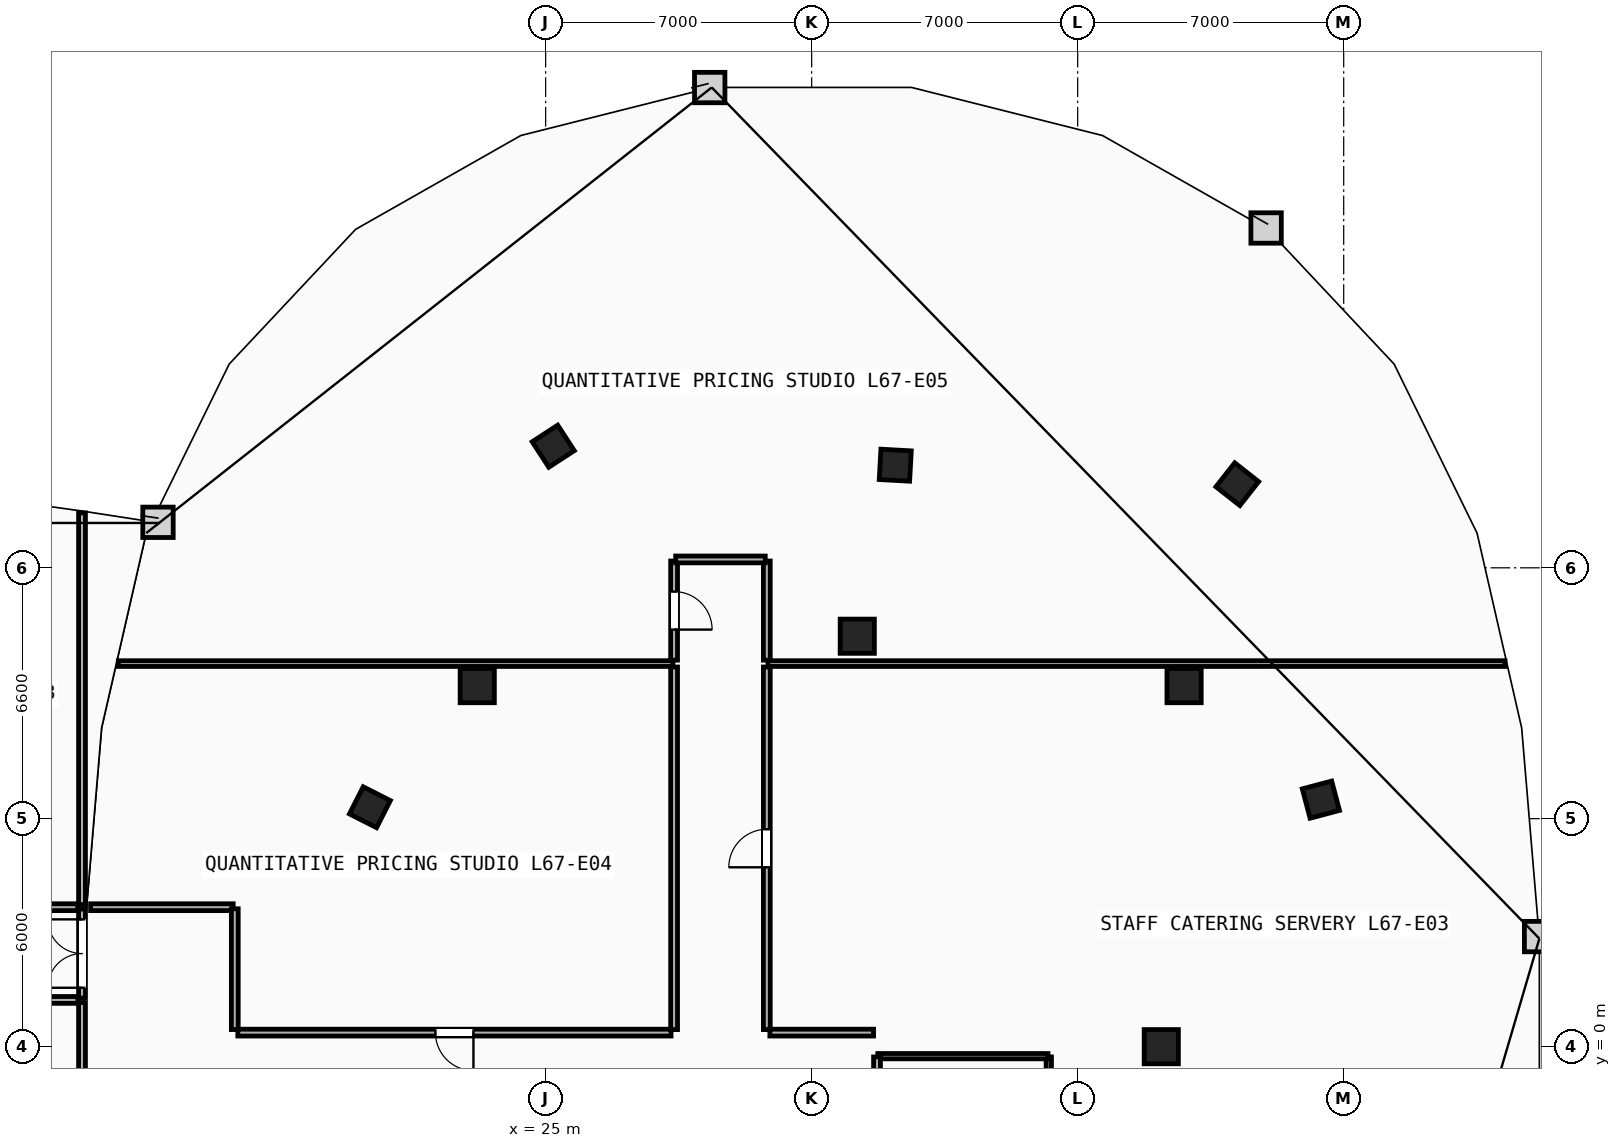
"""IFC4 building model, lengths in metres.
Left out: names, types, materials, properties, quantities, classifications, styles, units other than length and angle.
Written with IfcOpenShell. Run it as: python <this file> out.ifc"""

import sys

from ifc_helpers import new_model, si_unit, direction, frame, frame_2d, origin, origin_2d, place, context, subcontext, project, spatial, rectangle, extrude, element, fill, save


model = new_model("IFC4")
c1 = context("Model", 3, precision=1e-05, world=origin(), true_north=direction((0.0, 1.0)))
c2 = subcontext(c1, "Body", "Model", "MODEL_VIEW")
j1 = project(units=[si_unit("LENGTHUNIT", "METRE"), si_unit("PLANEANGLEUNIT", "RADIAN")], contexts=[c1])
p1 = place(None, origin())
s1 = spatial("IfcSite", under=j1, at=p1, CompositionType="ELEMENT")
p2 = place(p1, origin())
s2 = spatial("IfcBuilding", under=s1, at=p2, CompositionType="ELEMENT")
p3 = place(p2, frame((0.0, 0.0, 254.0)))
s3 = spatial("IfcBuildingStorey", under=s2, at=p3, CompositionType="ELEMENT", Elevation=254.0)
for number, where, z_axis, x_axis in (
    (1, (41.2, 0.0, 0.0), (0.0, 0.0, 1.0), (1.0, 0.0, 0.0)),
    (2, (41.8, 9.5, 0.0), (0.0, 0.0, 1.0), (1.0, 0.0, 0.0)),
    (3, (33.2, 10.8, 0.0), (0.0, 0.0, 1.0), (1.0, 0.0, 0.0)),
    (4, (23.2, 9.5, 0.0), (0.0, 0.0, 1.0), (1.0, 0.0, 0.0)),
):
    element("IfcColumn", number, at=place(p3, frame(where, z_axis=z_axis, x_axis=x_axis)), inside=s3, PredefinedType="COLUMN", context=c2, shape_type="SweptSolid", body=[
        extrude(rectangle(XDim=0.9, YDim=0.9, at=origin_2d()), origin(), (0.0, 0.0, 1.0), 3.6),
    ])
for number, where, z_axis, x_axis in (
    (5, (45.4, 6.5, 0.0), (0.0, 0.0, 1.0), (-0.256, 0.967, 0.0)),
    (6, (43.2, 14.8, 0.0), (0.0, 0.0, 1.0), (-0.786, 0.618, 0.0)),
    (7, (34.2, 15.3, 0.0), (0.0, 0.0, 1.0), (-0.998, 0.055, 0.0)),
    (8, (25.2, 15.8, 0.0), (0.0, 0.0, 1.0), (-0.838, -0.546, 0.0)),
    (9, (20.375, 6.3, 0.0), (0.0, 0.0, 1.0), (-0.453, -0.892, 0.0)),
):
    element("IfcColumn", number, at=place(p3, frame(where, z_axis=z_axis, x_axis=x_axis)), inside=s3, PredefinedType="COLUMN", context=c2, shape_type="SweptSolid", body=[
        extrude(rectangle(XDim=0.8, YDim=0.8, at=origin_2d()), origin(), (0.0, 0.0, 1.0), 3.6),
    ])
p4 = place(p3, frame((38.24, -4.545, 0.0), z_axis=(0.0, 0.0, 1.0), x_axis=(0.0, 1.0, 0.0)))
e10 = element("IfcWall", 10, at=p4, inside=s3, PredefinedType="PARTITIONING", context=c2, shape_type="SweptSolid", body=[
    extrude(rectangle(XDim=4.275, YDim=0.14, at=frame_2d((2.137, 0.0))), origin(), (0.0, 0.0, 1.0), 3.34),
])
p5 = place(p3, frame((33.74, -0.25, 0.0), z_axis=(0.0, 0.0, 1.0), x_axis=(1.0, 0.0, 0.0)))
e11 = element("IfcWall", 11, at=p5, inside=s3, PredefinedType="PARTITIONING", context=c2, shape_type="SweptSolid", body=[
    extrude(rectangle(XDim=4.48, YDim=0.14, at=frame_2d((2.24, 0.0))), origin(), (0.0, 0.0, 1.0), 3.34),
])
p6 = place(p3, frame((33.72, -4.53, 0.0), z_axis=(0.0, 0.0, 1.0), x_axis=(0.0, 1.0, 0.0)))
e12 = element("IfcWall", 12, at=p6, inside=s3, PredefinedType="PARTITIONING", context=c2, shape_type="SweptSolid", body=[
    extrude(rectangle(XDim=4.26, YDim=0.18, at=frame_2d((2.13, 0.0))), origin(), (0.0, 0.0, 1.0), 3.34),
])
p7 = place(p6, frame((1.655, 0.0, 0.0)))
e13 = element("IfcOpeningElement", 13, at=p7, cuts=e12, PredefinedType="OPENING", context=c2, shape_type="SweptSolid", body=[
    extrude(rectangle(XDim=0.95, YDim=2.1, at=frame_2d((0.475, 1.05))), frame((0.0, 0.1, 0.0), z_axis=(0.0, -1.0, 0.0), x_axis=(1.0, 0.0, 0.0)), (0.0, 0.0, 1.0), 0.2),
])
p8 = place(p3, frame((13.755, 10.08, 0.0), z_axis=(0.0, 0.0, 1.0), x_axis=(1.0, 0.0, 0.0)))
e14 = element("IfcWall", 14, at=p8, inside=s3, PredefinedType="PARTITIONING", context=c2, shape_type="SweptSolid", body=[
    extrude(rectangle(XDim=14.595, YDim=0.15, at=frame_2d((7.297, 0.0))), origin(), (0.0, 0.0, 1.0), 2.724),
])
p9 = place(p3, frame((30.85, 10.08, 0.0), z_axis=(0.0, 0.0, 1.0), x_axis=(1.0, 0.0, 0.0)))
e15 = element("IfcWall", 15, at=p9, inside=s3, PredefinedType="PARTITIONING", context=c2, shape_type="SweptSolid", body=[
    extrude(rectangle(XDim=19.395, YDim=0.15, at=frame_2d((9.697, 0.0))), origin(), (0.0, 0.0, 1.0), 2.724),
])
p10 = place(p3, frame((30.82, 0.45, 0.0), z_axis=(0.0, 0.0, 1.0), x_axis=(0.0, 1.0, 0.0)))
e16 = element("IfcWall", 16, at=p10, inside=s3, PredefinedType="PARTITIONING", context=c2, shape_type="SweptSolid", body=[
    extrude(rectangle(XDim=9.54, YDim=0.18, at=frame_2d((4.77, 0.0))), origin(), (0.0, 0.0, 1.0), 3.34),
])
p11 = place(p10, frame((4.27, 0.0, 0.0)))
e17 = element("IfcOpeningElement", 17, at=p11, cuts=e16, PredefinedType="OPENING", context=c2, shape_type="SweptSolid", body=[
    extrude(rectangle(XDim=1.0, YDim=2.15, at=frame_2d((0.5, 1.075))), frame((0.0, 0.1, 0.0), z_axis=(0.0, -1.0, 0.0), x_axis=(1.0, 0.0, 0.0)), (0.0, 0.0, 1.0), 0.2),
])
p12 = place(p3, frame((33.628, 0.37, 0.0), z_axis=(0.0, 0.0, 1.0), x_axis=(-1.0, 0.0, 0.0)))
e18 = element("IfcWall", 18, at=p12, inside=s3, PredefinedType="PARTITIONING", context=c2, shape_type="SweptSolid", body=[
    extrude(rectangle(XDim=2.729, YDim=0.18, at=frame_2d((1.364, 0.0))), origin(), (0.0, 0.0, 1.0), 3.34),
])
p13 = place(p3, frame((28.3, 0.37, 0.0), z_axis=(0.0, 0.0, 1.0), x_axis=(-1.0, 0.0, 0.0)))
e19 = element("IfcWall", 19, at=p13, inside=s3, PredefinedType="PARTITIONING", context=c2, shape_type="SweptSolid", body=[
    extrude(rectangle(XDim=11.4, YDim=0.18, at=frame_2d((5.7, 0.0))), origin(), (0.0, 0.0, 1.0), 3.34),
])
p14 = place(p13, frame((5.2, 0.0, 0.0)))
e20 = element("IfcOpeningElement", 20, at=p14, cuts=e19, PredefinedType="OPENING", context=c2, shape_type="SweptSolid", body=[
    extrude(rectangle(XDim=1.0, YDim=2.15, at=frame_2d((0.5, 1.075))), frame((0.0, 0.1, 0.0), z_axis=(0.0, -1.0, 0.0), x_axis=(1.0, 0.0, 0.0)), (0.0, 0.0, 1.0), 0.2),
])
p15 = place(p3, frame((28.38, 9.99, 0.0), z_axis=(0.0, 0.0, 1.0), x_axis=(0.0, -1.0, 0.0)))
e21 = element("IfcWall", 21, at=p15, inside=s3, PredefinedType="PARTITIONING", context=c2, shape_type="SweptSolid", body=[
    extrude(rectangle(XDim=9.54, YDim=0.18, at=frame_2d((4.77, 0.0))), origin(), (0.0, 0.0, 1.0), 3.34),
])
p16 = place(p3, frame((16.779, 3.67, 0.0), z_axis=(0.0, 0.0, 1.0), x_axis=(-1.0, 0.0, 0.0)))
e22 = element("IfcWall", 22, at=p16, inside=s3, PredefinedType="PARTITIONING", context=c2, shape_type="SweptSolid", body=[
    extrude(rectangle(XDim=3.753, YDim=0.18, at=frame_2d((1.876, 0.0))), origin(), (0.0, 0.0, 1.0), 3.34),
])
p17 = place(p3, frame((16.82, 0.45, 0.0), z_axis=(0.0, 0.0, 1.0), x_axis=(0.0, 1.0, 0.0)))
e23 = element("IfcWall", 23, at=p17, inside=s3, PredefinedType="PARTITIONING", context=c2, shape_type="SweptSolid", body=[
    extrude(rectangle(XDim=3.178, YDim=0.18, at=frame_2d((1.589, 0.0))), origin(), (0.0, 0.0, 1.0), 3.34),
])
p18 = place(p3, frame((28.38, 12.779, 0.0), z_axis=(0.0, 0.0, 1.0), x_axis=(0.0, -1.0, 0.0)))
e24 = element("IfcWall", 24, at=p18, inside=s3, PredefinedType="PARTITIONING", context=c2, shape_type="SweptSolid", body=[
    extrude(rectangle(XDim=2.609, YDim=0.18, at=frame_2d((1.304, 0.0))), origin(), (0.0, 0.0, 1.0), 3.34),
])
p19 = place(p18, frame((0.804, 0.0, 0.0)))
e25 = element("IfcOpeningElement", 25, at=p19, cuts=e24, PredefinedType="OPENING", context=c2, shape_type="SweptSolid", body=[
    extrude(rectangle(XDim=1.0, YDim=2.15, at=frame_2d((0.5, 1.075))), frame((0.0, 0.1, 0.0), z_axis=(0.0, -1.0, 0.0), x_axis=(1.0, 0.0, 0.0)), (0.0, 0.0, 1.0), 0.2),
])
p20 = place(p3, frame((30.82, 10.17, 0.0), z_axis=(0.0, 0.0, 1.0), x_axis=(0.0, 1.0, 0.0)))
e26 = element("IfcWall", 26, at=p20, inside=s3, PredefinedType="PARTITIONING", context=c2, shape_type="SweptSolid", body=[
    extrude(rectangle(XDim=2.609, YDim=0.18, at=frame_2d((1.304, 0.0))), origin(), (0.0, 0.0, 1.0), 3.34),
])
p21 = place(p3, frame((30.779, 12.82, 0.0), z_axis=(0.0, 0.0, 1.0), x_axis=(-1.0, 0.0, 0.0)))
e27 = element("IfcWall", 27, at=p21, inside=s3, PredefinedType="PARTITIONING", context=c2, shape_type="SweptSolid", body=[
    extrude(rectangle(XDim=2.357, YDim=0.18, at=frame_2d((1.179, 0.0))), origin(), (0.0, 0.0, 1.0), 3.34),
])
p22 = place(p3, frame((3.895, 1.23, 0.0), z_axis=(0.0, 0.0, 1.0), x_axis=(1.0, 0.0, 0.0)))
e28 = element("IfcWall", 28, at=p22, inside=s3, PredefinedType="PARTITIONING", context=c2, shape_type="SweptSolid", body=[
    extrude(rectangle(XDim=8.793, YDim=0.18, at=frame_2d((4.397, 0.0))), origin(), (0.0, 0.0, 1.0), 3.34),
])
p23 = place(p22, frame((3.597, 0.0, 0.0)))
e29 = element("IfcOpeningElement", 29, at=p23, cuts=e28, PredefinedType="OPENING", context=c2, shape_type="SweptSolid", body=[
    extrude(rectangle(XDim=1.6, YDim=2.2, at=frame_2d((0.8, 1.1))), frame((0.0, 0.1, 0.0), z_axis=(0.0, -1.0, 0.0), x_axis=(1.0, 0.0, 0.0)), (0.0, 0.0, 1.0), 0.2),
])
p24 = place(p3, frame((12.688, 3.67, 0.0), z_axis=(0.0, 0.0, 1.0), x_axis=(-1.0, 0.0, 0.0)))
e30 = element("IfcWall", 30, at=p24, inside=s3, PredefinedType="PARTITIONING", context=c2, shape_type="SweptSolid", body=[
    extrude(rectangle(XDim=8.793, YDim=0.18, at=frame_2d((4.397, 0.0))), origin(), (0.0, 0.0, 1.0), 3.34),
])
p25 = place(p24, frame((3.597, 0.0, 0.0)))
e31 = element("IfcOpeningElement", 31, at=p25, cuts=e30, PredefinedType="OPENING", context=c2, shape_type="SweptSolid", body=[
    extrude(rectangle(XDim=1.6, YDim=2.2, at=frame_2d((0.8, 1.1))), frame((0.0, 0.1, 0.0), z_axis=(0.0, -1.0, 0.0), x_axis=(1.0, 0.0, 0.0)), (0.0, 0.0, 1.0), 0.2),
])
p26 = place(p3, frame((12.8, -14.044, 0.0), z_axis=(0.0, 0.0, 1.0), x_axis=(0.0, 1.0, 0.0)))
e32 = element("IfcWall", 32, at=p26, inside=s3, PredefinedType="PARTITIONING", context=c2, shape_type="SweptSolid", body=[
    extrude(rectangle(XDim=15.204, YDim=0.18, at=frame_2d((7.602, 0.0))), origin(), (0.0, 0.0, 1.0), 3.34),
])
p27 = place(p3, frame((12.8, 3.74, 0.0), z_axis=(0.0, 0.0, 1.0), x_axis=(0.0, 1.0, 0.0)))
e33 = element("IfcWall", 33, at=p27, inside=s3, PredefinedType="PARTITIONING", context=c2, shape_type="SweptSolid", body=[
    extrude(rectangle(XDim=10.304, YDim=0.18, at=frame_2d((5.152, 0.0))), origin(), (0.0, 0.0, 1.0), 3.34),
])
p28 = place(p3, frame((12.8, 1.28, 0.0), z_axis=(0.0, 0.0, 1.0), x_axis=(0.0, 1.0, 0.0)))
e34 = element("IfcWall", 34, at=p28, inside=s3, PredefinedType="PARTITIONING", context=c2, shape_type="SweptSolid", body=[
    extrude(rectangle(XDim=2.34, YDim=0.18, at=frame_2d((1.17, 0.0))), origin(), (0.0, 0.0, 1.0), 3.34),
])
p29 = place(p28, frame((0.27, 0.0, 0.0)))
e35 = element("IfcOpeningElement", 35, at=p29, cuts=e34, PredefinedType="OPENING", context=c2, shape_type="SweptSolid", body=[
    extrude(rectangle(XDim=1.8, YDim=2.25, at=frame_2d((0.9, 1.125))), frame((0.0, 0.1, 0.0), z_axis=(0.0, -1.0, 0.0), x_axis=(1.0, 0.0, 0.0)), (0.0, 0.0, 1.0), 0.2),
])
p30 = place(p14, origin())
e36 = element("IfcDoor", 36, at=p30, inside=s3, OperationType="SINGLE_SWING_LEFT", PredefinedType="DOOR", context=c2, shape_type="SweptSolid", body=[
    extrude(rectangle(XDim=1.0, YDim=2.15, at=frame_2d((0.5, 1.075))), frame((0.0, 0.025, 0.0), z_axis=(0.0, -1.0, 0.0), x_axis=(1.0, 0.0, 0.0)), (0.0, 0.0, 1.0), 0.05),
])
fill(e20, e36)
p31 = place(p11, origin())
e37 = element("IfcDoor", 37, at=p31, inside=s3, OperationType="SINGLE_SWING_LEFT", PredefinedType="DOOR", context=c2, shape_type="SweptSolid", body=[
    extrude(rectangle(XDim=1.0, YDim=2.15, at=frame_2d((0.5, 1.075))), frame((0.0, 0.025, 0.0), z_axis=(0.0, -1.0, 0.0), x_axis=(1.0, 0.0, 0.0)), (0.0, 0.0, 1.0), 0.05),
])
fill(e17, e37)
p32 = place(p19, origin())
e38 = element("IfcDoor", 38, at=p32, inside=s3, OperationType="SINGLE_SWING_RIGHT", PredefinedType="DOOR", context=c2, shape_type="SweptSolid", body=[
    extrude(rectangle(XDim=1.0, YDim=2.15, at=frame_2d((0.5, 1.075))), frame((0.0, 0.025, 0.0), z_axis=(0.0, -1.0, 0.0), x_axis=(1.0, 0.0, 0.0)), (0.0, 0.0, 1.0), 0.05),
])
fill(e25, e38)
p33 = place(p29, origin())
e39 = element("IfcDoor", 39, at=p33, inside=s3, OperationType="DOUBLE_DOOR_SINGLE_SWING", PredefinedType="DOOR", context=c2, shape_type="SweptSolid", body=[
    extrude(rectangle(XDim=1.8, YDim=2.25, at=frame_2d((0.9, 1.125))), frame((0.0, 0.025, 0.0), z_axis=(0.0, -1.0, 0.0), x_axis=(1.0, 0.0, 0.0)), (0.0, 0.0, 1.0), 0.05),
])
fill(e35, e39)
save(model, sys.argv[1])
